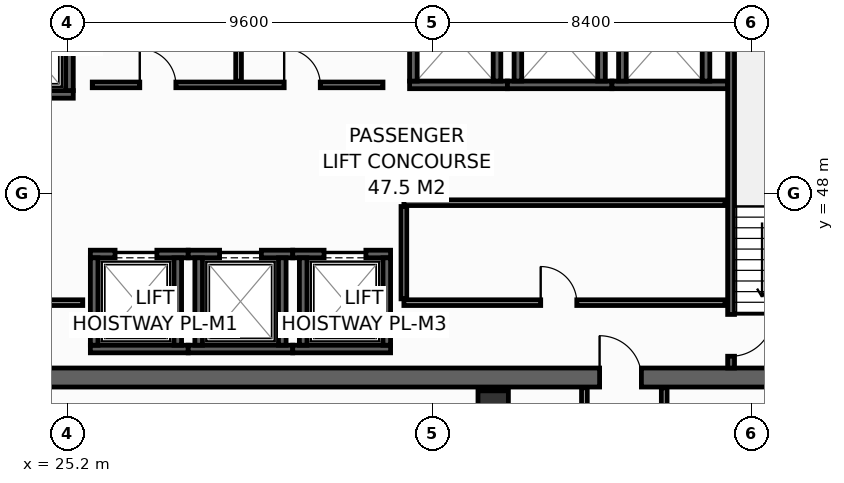
"""IFC4 building model, lengths in metres.
Left out: names, types, materials, properties, quantities, classifications, styles, units other than length and angle.
Written with IfcOpenShell. Run it as: python <this file> out.ifc"""

import sys

from ifc_helpers import new_model, si_unit, direction, frame, frame_2d, origin, origin_2d, place, context, subcontext, project, spatial, rectangle, hollow_rectangle, extrude, element, fill, save


model = new_model("IFC4")
c1 = context("Model", 3, precision=1e-05, world=origin(), true_north=direction((0.0, 1.0)))
c2 = subcontext(c1, "Body", "Model", "MODEL_VIEW")
j1 = project(units=[si_unit("LENGTHUNIT", "METRE"), si_unit("PLANEANGLEUNIT", "RADIAN")], contexts=[c1])
p1 = place(None, origin())
s1 = spatial("IfcSite", under=j1, at=p1, CompositionType="ELEMENT")
p2 = place(p1, origin())
s2 = spatial("IfcBuilding", under=s1, at=p2, CompositionType="ELEMENT")
p3 = place(p2, frame((0.0, 0.0, 213.2)))
s3 = spatial("IfcBuildingStorey", under=s2, at=p3, CompositionType="ELEMENT", Elevation=213.2)
p4 = place(p3, frame((13.6, 43.15, 0.0), z_axis=(0.0, 0.0, 1.0), x_axis=(1.0, 0.0, 0.0)))
e1 = element("IfcWall", 1, at=p4, inside=s3, PredefinedType="SHEAR", context=c2, shape_type="SweptSolid", body=[
    extrude(rectangle(XDim=32.7, YDim=0.5, at=frame_2d((16.35, 0.0))), origin(), (0.0, 0.0, 1.0), 3.55),
])
p5 = place(p4, frame((5.4, 0.0, 0.0)))
e2 = element("IfcOpeningElement", 2, at=p5, cuts=e1, PredefinedType="OPENING", context=c2, shape_type="SweptSolid", body=[
    extrude(rectangle(XDim=1.1, YDim=2.15, at=frame_2d((0.55, 1.075))), frame((0.0, 0.26, 0.0), z_axis=(0.0, -1.0, 0.0), x_axis=(1.0, 0.0, 0.0)), (0.0, 0.0, 1.0), 0.52),
])
p6 = place(p4, frame((25.6, 0.0, 0.0)))
e3 = element("IfcOpeningElement", 3, at=p6, cuts=e1, PredefinedType="OPENING", context=c2, shape_type="SweptSolid", body=[
    extrude(rectangle(XDim=1.1, YDim=2.15, at=frame_2d((0.55, 1.075))), frame((0.0, 0.26, 0.0), z_axis=(0.0, -1.0, 0.0), x_axis=(1.0, 0.0, 0.0)), (0.0, 0.0, 1.0), 0.52),
])
p7 = place(p3, frame((36.4, 42.4, 0.0), z_axis=(0.0, 0.0, 1.0), x_axis=(1.0, 0.0, 0.0)))
e4 = element("IfcColumn", 4, at=p7, inside=s3, PredefinedType="COLUMN", context=c2, shape_type="SweptSolid", body=[
    extrude(hollow_rectangle(XDim=0.8, YDim=0.8, WallThickness=0.036, at=origin_2d()), origin(), (0.0, 0.0, 1.0), 3.8),
])
p8 = place(p3, frame((22.5, 50.6, 0.0), z_axis=(0.0, 0.0, 1.0), x_axis=(1.0, 0.0, 0.0)))
e5 = element("IfcWall", 5, at=p8, inside=s3, PredefinedType="SHEAR", context=c2, shape_type="SweptSolid", body=[
    extrude(rectangle(XDim=2.85, YDim=0.2, at=frame_2d((1.425, 0.0))), origin(), (0.0, 0.0, 1.0), 3.55),
])
p9 = place(p8, frame((0.925, 0.0, 0.0)))
e6 = element("IfcOpeningElement", 6, at=p9, cuts=e5, PredefinedType="OPENING", context=c2, shape_type="SweptSolid", body=[
    extrude(rectangle(XDim=1.25, YDim=2.3, at=frame_2d((0.625, 1.15))), frame((0.0, 0.11, 0.0), z_axis=(0.0, -1.0, 0.0), x_axis=(1.0, 0.0, 0.0)), (0.0, 0.0, 1.0), 0.22),
])
p10 = place(p3, frame((25.25, 50.7, 0.0), z_axis=(0.0, 0.0, 1.0), x_axis=(0.0, 1.0, 0.0)))
e7 = element("IfcWall", 7, at=p10, inside=s3, PredefinedType="SHEAR", context=c2, shape_type="SweptSolid", body=[
    extrude(rectangle(XDim=2.6, YDim=0.2, at=frame_2d((1.3, 0.0))), origin(), (0.0, 0.0, 1.0), 3.55),
])
p11 = place(p3, frame((25.8, 43.9, 0.0), z_axis=(0.0, 0.0, 1.0), x_axis=(1.0, 0.0, 0.0)))
e8 = element("IfcWall", 8, at=p11, inside=s3, PredefinedType="SHEAR", context=c2, shape_type="SweptSolid", body=[
    extrude(rectangle(XDim=2.575, YDim=0.2, at=frame_2d((1.288, 0.0))), origin(), (0.0, 0.0, 1.0), 3.55),
])
p12 = place(p3, frame((25.8, 46.4, 0.0), z_axis=(0.0, 0.0, 1.0), x_axis=(1.0, 0.0, 0.0)))
e9 = element("IfcWall", 9, at=p12, inside=s3, PredefinedType="SHEAR", context=c2, shape_type="SweptSolid", body=[
    extrude(rectangle(XDim=2.575, YDim=0.2, at=frame_2d((1.288, 0.0))), origin(), (0.0, 0.0, 1.0), 3.55),
])
p13 = place(p12, frame((0.65, 0.0, 0.0)))
e10 = element("IfcOpeningElement", 10, at=p13, cuts=e9, PredefinedType="OPENING", context=c2, shape_type="SweptSolid", body=[
    extrude(rectangle(XDim=1.1, YDim=2.2, at=frame_2d((0.55, 1.1))), frame((0.0, 0.11, 0.0), z_axis=(0.0, -1.0, 0.0), x_axis=(1.0, 0.0, 0.0)), (0.0, 0.0, 1.0), 0.22),
])
for number, where, z_axis, x_axis in (
    (11, (25.9, 44.0, 0.0), (0.0, 0.0, 1.0), (0.0, 1.0, 0.0)),
    (12, (28.1, 44.0, 0.0), (0.0, 0.0, 1.0), (0.0, 1.0, 0.0)),
):
    element("IfcWall", number, at=place(p3, frame(where, z_axis=z_axis, x_axis=x_axis)), inside=s3, PredefinedType="SHEAR", context=c2, shape_type="SweptSolid", body=[
        extrude(rectangle(XDim=2.3, YDim=0.2, at=frame_2d((1.15, 0.0))), origin(), (0.0, 0.0, 1.0), 3.55),
    ])
p14 = place(p3, frame((28.375, 43.9, 0.0), z_axis=(0.0, 0.0, 1.0), x_axis=(1.0, 0.0, 0.0)))
e13 = element("IfcWall", 13, at=p14, inside=s3, PredefinedType="SHEAR", context=c2, shape_type="SweptSolid", body=[
    extrude(rectangle(XDim=2.75, YDim=0.2, at=frame_2d((1.375, 0.0))), origin(), (0.0, 0.0, 1.0), 3.55),
])
p15 = place(p3, frame((28.375, 46.4, 0.0), z_axis=(0.0, 0.0, 1.0), x_axis=(1.0, 0.0, 0.0)))
e14 = element("IfcWall", 14, at=p15, inside=s3, PredefinedType="SHEAR", context=c2, shape_type="SweptSolid", body=[
    extrude(rectangle(XDim=2.75, YDim=0.2, at=frame_2d((1.375, 0.0))), origin(), (0.0, 0.0, 1.0), 3.55),
])
p16 = place(p15, frame((0.825, 0.0, 0.0)))
e15 = element("IfcOpeningElement", 15, at=p16, cuts=e14, PredefinedType="OPENING", context=c2, shape_type="SweptSolid", body=[
    extrude(rectangle(XDim=1.1, YDim=2.2, at=frame_2d((0.55, 1.1))), frame((0.0, 0.11, 0.0), z_axis=(0.0, -1.0, 0.0), x_axis=(1.0, 0.0, 0.0)), (0.0, 0.0, 1.0), 0.22),
])
for number, where, z_axis, x_axis in (
    (16, (28.65, 44.0, 0.0), (0.0, 0.0, 1.0), (0.0, 1.0, 0.0)),
    (17, (30.85, 44.0, 0.0), (0.0, 0.0, 1.0), (0.0, 1.0, 0.0)),
):
    element("IfcWall", number, at=place(p3, frame(where, z_axis=z_axis, x_axis=x_axis)), inside=s3, PredefinedType="SHEAR", context=c2, shape_type="SweptSolid", body=[
        extrude(rectangle(XDim=2.3, YDim=0.2, at=frame_2d((1.15, 0.0))), origin(), (0.0, 0.0, 1.0), 3.55),
    ])
p17 = place(p3, frame((31.125, 43.9, 0.0), z_axis=(0.0, 0.0, 1.0), x_axis=(1.0, 0.0, 0.0)))
e18 = element("IfcWall", 18, at=p17, inside=s3, PredefinedType="SHEAR", context=c2, shape_type="SweptSolid", body=[
    extrude(rectangle(XDim=2.575, YDim=0.2, at=frame_2d((1.288, 0.0))), origin(), (0.0, 0.0, 1.0), 3.55),
])
p18 = place(p3, frame((31.125, 46.4, 0.0), z_axis=(0.0, 0.0, 1.0), x_axis=(1.0, 0.0, 0.0)))
e19 = element("IfcWall", 19, at=p18, inside=s3, PredefinedType="SHEAR", context=c2, shape_type="SweptSolid", body=[
    extrude(rectangle(XDim=2.575, YDim=0.2, at=frame_2d((1.288, 0.0))), origin(), (0.0, 0.0, 1.0), 3.55),
])
p19 = place(p18, frame((0.825, 0.0, 0.0)))
e20 = element("IfcOpeningElement", 20, at=p19, cuts=e19, PredefinedType="OPENING", context=c2, shape_type="SweptSolid", body=[
    extrude(rectangle(XDim=1.1, YDim=2.2, at=frame_2d((0.55, 1.1))), frame((0.0, 0.11, 0.0), z_axis=(0.0, -1.0, 0.0), x_axis=(1.0, 0.0, 0.0)), (0.0, 0.0, 1.0), 0.22),
])
for number, where, z_axis, x_axis in (
    (21, (31.4, 44.0, 0.0), (0.0, 0.0, 1.0), (0.0, 1.0, 0.0)),
    (22, (33.6, 44.0, 0.0), (0.0, 0.0, 1.0), (0.0, 1.0, 0.0)),
):
    element("IfcWall", number, at=place(p3, frame(where, z_axis=z_axis, x_axis=x_axis)), inside=s3, PredefinedType="SHEAR", context=c2, shape_type="SweptSolid", body=[
        extrude(rectangle(XDim=2.3, YDim=0.2, at=frame_2d((1.15, 0.0))), origin(), (0.0, 0.0, 1.0), 3.55),
    ])
p20 = place(p3, frame((34.2, 50.85, 0.0), z_axis=(0.0, 0.0, 1.0), x_axis=(1.0, 0.0, 0.0)))
e23 = element("IfcWall", 23, at=p20, inside=s3, PredefinedType="SHEAR", context=c2, shape_type="SweptSolid", body=[
    extrude(rectangle(XDim=2.575, YDim=0.2, at=frame_2d((1.288, 0.0))), origin(), (0.0, 0.0, 1.0), 3.55),
])
for number, where, z_axis, x_axis in (
    (24, (34.3, 50.95, 0.0), (0.0, 0.0, 1.0), (0.0, 1.0, 0.0)),
    (25, (36.5, 50.95, 0.0), (0.0, 0.0, 1.0), (0.0, 1.0, 0.0)),
):
    element("IfcWall", number, at=place(p3, frame(where, z_axis=z_axis, x_axis=x_axis)), inside=s3, PredefinedType="SHEAR", context=c2, shape_type="SweptSolid", body=[
        extrude(rectangle(XDim=2.3, YDim=0.2, at=frame_2d((1.15, 0.0))), origin(), (0.0, 0.0, 1.0), 3.55),
    ])
p21 = place(p3, frame((36.775, 50.85, 0.0), z_axis=(0.0, 0.0, 1.0), x_axis=(1.0, 0.0, 0.0)))
e26 = element("IfcWall", 26, at=p21, inside=s3, PredefinedType="SHEAR", context=c2, shape_type="SweptSolid", body=[
    extrude(rectangle(XDim=2.75, YDim=0.2, at=frame_2d((1.375, 0.0))), origin(), (0.0, 0.0, 1.0), 3.55),
])
for number, where, z_axis, x_axis in (
    (27, (37.05, 50.95, 0.0), (0.0, 0.0, 1.0), (0.0, 1.0, 0.0)),
    (28, (39.25, 50.95, 0.0), (0.0, 0.0, 1.0), (0.0, 1.0, 0.0)),
):
    element("IfcWall", number, at=place(p3, frame(where, z_axis=z_axis, x_axis=x_axis)), inside=s3, PredefinedType="SHEAR", context=c2, shape_type="SweptSolid", body=[
        extrude(rectangle(XDim=2.3, YDim=0.2, at=frame_2d((1.15, 0.0))), origin(), (0.0, 0.0, 1.0), 3.55),
    ])
p22 = place(p3, frame((39.525, 50.85, 0.0), z_axis=(0.0, 0.0, 1.0), x_axis=(1.0, 0.0, 0.0)))
e29 = element("IfcWall", 29, at=p22, inside=s3, PredefinedType="SHEAR", context=c2, shape_type="SweptSolid", body=[
    extrude(rectangle(XDim=3.045, YDim=0.2, at=frame_2d((1.522, 0.0))), origin(), (0.0, 0.0, 1.0), 3.55),
])
for number, where, z_axis, x_axis in (
    (30, (39.8, 50.95, 0.0), (0.0, 0.0, 1.0), (0.0, 1.0, 0.0)),
    (31, (42.0, 50.95, 0.0), (0.0, 0.0, 1.0), (0.0, 1.0, 0.0)),
):
    element("IfcWall", number, at=place(p3, frame(where, z_axis=z_axis, x_axis=x_axis)), inside=s3, PredefinedType="SHEAR", context=c2, shape_type="SweptSolid", body=[
        extrude(rectangle(XDim=2.3, YDim=0.2, at=frame_2d((1.15, 0.0))), origin(), (0.0, 0.0, 1.0), 3.55),
    ])
p23 = place(p3, frame((42.66, 53.8, 0.0), z_axis=(0.0, 0.0, 1.0), x_axis=(0.0, -1.0, 0.0)))
e32 = element("IfcWall", 32, at=p23, inside=s3, PredefinedType="SHEAR", context=c2, shape_type="SweptSolid", body=[
    extrude(rectangle(XDim=10.4, YDim=0.18, at=frame_2d((5.2, 0.0))), origin(), (0.0, 0.0, 1.0), 3.55),
])
p24 = place(p23, frame((8.99, 0.0, 0.0)))
e33 = element("IfcOpeningElement", 33, at=p24, cuts=e32, PredefinedType="OPENING", context=c2, shape_type="SweptSolid", body=[
    extrude(rectangle(XDim=1.1, YDim=2.15, at=frame_2d((0.55, 1.075))), frame((0.0, 0.1, 0.0), z_axis=(0.0, -1.0, 0.0), x_axis=(1.0, 0.0, 0.0)), (0.0, 0.0, 1.0), 0.2),
])
p25 = place(p3, frame((22.68, 45.12, 0.0), z_axis=(0.0, 0.0, 1.0), x_axis=(1.0, 0.0, 0.0)))
e34 = element("IfcWall", 34, at=p25, inside=s3, PredefinedType="PARTITIONING", context=c2, shape_type="SweptSolid", body=[
    extrude(rectangle(XDim=2.92, YDim=0.15, at=frame_2d((1.46, 0.0))), origin(), (0.0, 0.0, 1.0), 3.55),
])
p26 = place(p25, frame((0.85, 0.0, 0.0)))
e35 = element("IfcOpeningElement", 35, at=p26, cuts=e34, PredefinedType="OPENING", context=c2, shape_type="SweptSolid", body=[
    extrude(rectangle(XDim=1.1, YDim=2.15, at=frame_2d((0.55, 1.075))), frame((0.0, 0.085, 0.0), z_axis=(0.0, -1.0, 0.0), x_axis=(1.0, 0.0, 0.0)), (0.0, 0.0, 1.0), 0.17),
])
p27 = place(p3, frame((34.05, 45.12, 0.0), z_axis=(0.0, 0.0, 1.0), x_axis=(1.0, 0.0, 0.0)))
e36 = element("IfcWall", 36, at=p27, inside=s3, PredefinedType="PARTITIONING", context=c2, shape_type="SweptSolid", body=[
    extrude(rectangle(XDim=8.45, YDim=0.15, at=frame_2d((4.225, 0.0))), origin(), (0.0, 0.0, 1.0), 3.55),
])
p28 = place(p27, frame((3.6, 0.0, 0.0)))
e37 = element("IfcOpeningElement", 37, at=p28, cuts=e36, PredefinedType="OPENING", context=c2, shape_type="SweptSolid", body=[
    extrude(rectangle(XDim=0.95, YDim=2.15, at=frame_2d((0.475, 1.075))), frame((0.0, 0.085, 0.0), z_axis=(0.0, -1.0, 0.0), x_axis=(1.0, 0.0, 0.0)), (0.0, 0.0, 1.0), 0.17),
])
p29 = place(p3, frame((34.05, 47.75, 0.0), z_axis=(0.0, 0.0, 1.0), x_axis=(1.0, 0.0, 0.0)))
e38 = element("IfcWall", 38, at=p29, inside=s3, PredefinedType="PARTITIONING", context=c2, shape_type="SweptSolid", body=[
    extrude(rectangle(XDim=8.45, YDim=0.15, at=frame_2d((4.225, 0.0))), origin(), (0.0, 0.0, 1.0), 3.55),
])
p30 = place(p3, frame((34.05, 45.22, 0.0), z_axis=(0.0, 0.0, 1.0), x_axis=(0.0, 1.0, 0.0)))
e39 = element("IfcWall", 39, at=p30, inside=s3, PredefinedType="PARTITIONING", context=c2, shape_type="SweptSolid", body=[
    extrude(rectangle(XDim=2.43, YDim=0.15, at=frame_2d((1.215, 0.0))), origin(), (0.0, 0.0, 1.0), 3.55),
])
p31 = place(p3, frame((25.85, 50.85, 0.0), z_axis=(0.0, 0.0, 1.0), x_axis=(1.0, 0.0, 0.0)))
e40 = element("IfcWall", 40, at=p31, inside=s3, PredefinedType="PARTITIONING", context=c2, shape_type="SweptSolid", body=[
    extrude(rectangle(XDim=7.65, YDim=0.15, at=frame_2d((3.825, 0.0))), origin(), (0.0, 0.0, 1.0), 3.55),
])
p32 = place(p31, frame((1.25, 0.0, 0.0)))
e41 = element("IfcOpeningElement", 41, at=p32, cuts=e40, PredefinedType="OPENING", context=c2, shape_type="SweptSolid", body=[
    extrude(rectangle(XDim=0.95, YDim=2.15, at=frame_2d((0.475, 1.075))), frame((0.0, 0.085, 0.0), z_axis=(0.0, -1.0, 0.0), x_axis=(1.0, 0.0, 0.0)), (0.0, 0.0, 1.0), 0.17),
])
p33 = place(p31, frame((5.05, 0.0, 0.0)))
e42 = element("IfcOpeningElement", 42, at=p33, cuts=e40, PredefinedType="OPENING", context=c2, shape_type="SweptSolid", body=[
    extrude(rectangle(XDim=0.95, YDim=2.15, at=frame_2d((0.475, 1.075))), frame((0.0, 0.085, 0.0), z_axis=(0.0, -1.0, 0.0), x_axis=(1.0, 0.0, 0.0)), (0.0, 0.0, 1.0), 0.17),
])
p34 = place(p3, frame((29.7, 50.95, 0.0), z_axis=(0.0, 0.0, 1.0), x_axis=(0.0, 1.0, 0.0)))
e43 = element("IfcWall", 43, at=p34, inside=s3, PredefinedType="PARTITIONING", context=c2, shape_type="SweptSolid", body=[
    extrude(rectangle(XDim=2.7, YDim=0.15, at=frame_2d((1.35, 0.0))), origin(), (0.0, 0.0, 1.0), 3.55),
])
for number, where, z_axis, x_axis in (
    (44, (38.8, 40.75, 0.0), (0.0, 0.0, 1.0), (0.0, 1.0, 0.0)),
    (45, (40.9, 40.75, 0.0), (0.0, 0.0, 1.0), (0.0, 1.0, 0.0)),
):
    element("IfcWall", number, at=place(p3, frame(where, z_axis=z_axis, x_axis=x_axis)), inside=s3, PredefinedType="PARTITIONING", context=c2, shape_type="SweptSolid", body=[
        extrude(rectangle(XDim=2.13, YDim=0.15, at=frame_2d((1.065, 0.0))), origin(), (0.0, 0.0, 1.0), 3.55),
    ])
p35 = place(p13, origin())
e46 = element("IfcDoor", 46, at=p35, inside=s3, OperationType="SLIDING_TO_LEFT", PredefinedType="DOOR", context=c2, shape_type="SweptSolid", body=[
    extrude(rectangle(XDim=1.1, YDim=2.2, at=frame_2d((0.55, 1.1))), frame((0.0, 0.025, 0.0), z_axis=(0.0, -1.0, 0.0), x_axis=(1.0, 0.0, 0.0)), (0.0, 0.0, 1.0), 0.05),
])
fill(e10, e46)
p36 = place(p16, origin())
e47 = element("IfcDoor", 47, at=p36, inside=s3, OperationType="SLIDING_TO_LEFT", PredefinedType="DOOR", context=c2, shape_type="SweptSolid", body=[
    extrude(rectangle(XDim=1.1, YDim=2.2, at=frame_2d((0.55, 1.1))), frame((0.0, 0.025, 0.0), z_axis=(0.0, -1.0, 0.0), x_axis=(1.0, 0.0, 0.0)), (0.0, 0.0, 1.0), 0.05),
])
fill(e15, e47)
p37 = place(p19, origin())
e48 = element("IfcDoor", 48, at=p37, inside=s3, OperationType="SLIDING_TO_LEFT", PredefinedType="DOOR", context=c2, shape_type="SweptSolid", body=[
    extrude(rectangle(XDim=1.1, YDim=2.2, at=frame_2d((0.55, 1.1))), frame((0.0, 0.025, 0.0), z_axis=(0.0, -1.0, 0.0), x_axis=(1.0, 0.0, 0.0)), (0.0, 0.0, 1.0), 0.05),
])
fill(e20, e48)
p38 = place(p24, origin())
e49 = element("IfcDoor", 49, at=p38, inside=s3, OperationType="SINGLE_SWING_LEFT", PredefinedType="DOOR", context=c2, shape_type="SweptSolid", body=[
    extrude(rectangle(XDim=1.1, YDim=2.15, at=frame_2d((0.55, 1.075))), frame((0.0, 0.025, 0.0), z_axis=(0.0, -1.0, 0.0), x_axis=(1.0, 0.0, 0.0)), (0.0, 0.0, 1.0), 0.05),
])
fill(e33, e49)
p39 = place(p6, origin())
e50 = element("IfcDoor", 50, at=p39, inside=s3, OperationType="SINGLE_SWING_LEFT", PredefinedType="DOOR", context=c2, shape_type="SweptSolid", body=[
    extrude(rectangle(XDim=1.1, YDim=2.15, at=frame_2d((0.55, 1.075))), frame((0.0, 0.025, 0.0), z_axis=(0.0, -1.0, 0.0), x_axis=(1.0, 0.0, 0.0)), (0.0, 0.0, 1.0), 0.05),
])
fill(e3, e50)
p40 = place(p28, origin())
e51 = element("IfcDoor", 51, at=p40, inside=s3, OperationType="SINGLE_SWING_LEFT", PredefinedType="DOOR", context=c2, shape_type="SweptSolid", body=[
    extrude(rectangle(XDim=0.95, YDim=2.15, at=frame_2d((0.475, 1.075))), frame((0.0, 0.025, 0.0), z_axis=(0.0, -1.0, 0.0), x_axis=(1.0, 0.0, 0.0)), (0.0, 0.0, 1.0), 0.05),
])
fill(e37, e51)
p41 = place(p32, origin())
e52 = element("IfcDoor", 52, at=p41, inside=s3, OperationType="SINGLE_SWING_LEFT", PredefinedType="DOOR", context=c2, shape_type="SweptSolid", body=[
    extrude(rectangle(XDim=0.95, YDim=2.15, at=frame_2d((0.475, 1.075))), frame((0.0, 0.025, 0.0), z_axis=(0.0, -1.0, 0.0), x_axis=(1.0, 0.0, 0.0)), (0.0, 0.0, 1.0), 0.05),
])
fill(e41, e52)
p42 = place(p33, origin())
e53 = element("IfcDoor", 53, at=p42, inside=s3, OperationType="SINGLE_SWING_LEFT", PredefinedType="DOOR", context=c2, shape_type="SweptSolid", body=[
    extrude(rectangle(XDim=0.95, YDim=2.15, at=frame_2d((0.475, 1.075))), frame((0.0, 0.025, 0.0), z_axis=(0.0, -1.0, 0.0), x_axis=(1.0, 0.0, 0.0)), (0.0, 0.0, 1.0), 0.05),
])
fill(e42, e53)
save(model, sys.argv[1])
